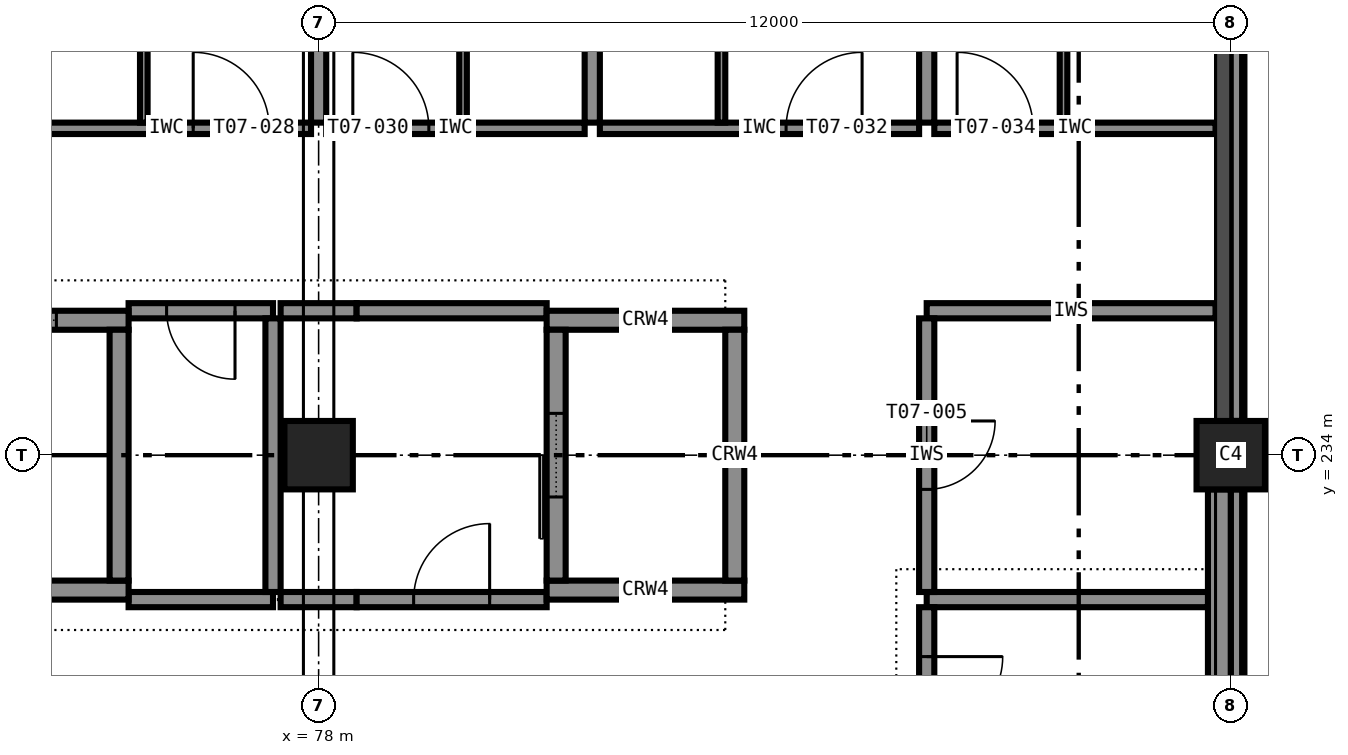
"""IFC4 building model, lengths in metres.
Left out: names, types, materials, properties, quantities, classifications, styles, units other than length and angle.
Written with IfcOpenShell. Run it as: python <this file> out.ifc"""

import sys

from ifc_helpers import new_model, si_unit, direction, frame, frame_2d, origin, origin_2d, place, context, subcontext, project, spatial, rectangle, extrude, element, fill, save


model = new_model("IFC4")
c1 = context("Model", 3, precision=1e-05, world=origin(), true_north=direction((0.0, 1.0)))
c2 = subcontext(c1, "Body", "Model", "MODEL_VIEW")
j1 = project(units=[si_unit("LENGTHUNIT", "METRE"), si_unit("PLANEANGLEUNIT", "RADIAN")], contexts=[c1])
p1 = place(None, origin())
s1 = spatial("IfcSite", under=j1, at=p1, CompositionType="ELEMENT")
p2 = place(p1, origin())
s2 = spatial("IfcBuilding", under=s1, at=p2, CompositionType="ELEMENT")
p3 = place(p2, frame((0.0, 0.0, 31.8)))
s3 = spatial("IfcBuildingStorey", under=s2, at=p3, CompositionType="ELEMENT", Elevation=31.8)
for number, where, z_axis, x_axis in (
    (1, (78.0, 234.0, 0.0), (0.0, 0.0, 1.0), (1.0, 0.0, 0.0)),
    (2, (90.0, 234.0, 0.0), (0.0, 0.0, 1.0), (1.0, 0.0, 0.0)),
):
    element("IfcColumn", number, at=place(p3, frame(where, z_axis=z_axis, x_axis=x_axis)), inside=s3, PredefinedType="COLUMN", context=c2, shape_type="SweptSolid", body=[
        extrude(rectangle(XDim=0.9, YDim=0.9, at=origin_2d()), origin(), (0.0, 0.0, 1.0), 3.6),
    ])
p4 = place(p3, frame((72.5, 232.225, 0.0), z_axis=(0.0, 0.0, 1.0), x_axis=(1.0, 0.0, 0.0)))
e3 = element("IfcWall", 3, at=p4, inside=s3, PredefinedType="SHEAR", context=c2, shape_type="SweptSolid", body=[
    extrude(rectangle(XDim=3.0, YDim=0.25, at=frame_2d((1.5, 0.0))), origin(), (0.0, 0.0, 1.0), 3.6),
])
p5 = place(p3, frame((72.5, 235.775, 0.0), z_axis=(0.0, 0.0, 1.0), x_axis=(1.0, 0.0, 0.0)))
e4 = element("IfcWall", 4, at=p5, inside=s3, PredefinedType="SHEAR", context=c2, shape_type="SweptSolid", body=[
    extrude(rectangle(XDim=3.0, YDim=0.25, at=frame_2d((1.5, 0.0))), origin(), (0.0, 0.0, 1.0), 3.6),
])
p6 = place(p5, frame((0.95, 0.0, 0.0)))
e5 = element("IfcOpeningElement", 5, at=p6, cuts=e4, PredefinedType="OPENING", context=c2, shape_type="SweptSolid", body=[
    extrude(rectangle(XDim=1.1, YDim=2.1, at=frame_2d((0.55, 1.05))), frame((0.0, 0.135, 0.0), z_axis=(0.0, -1.0, 0.0), x_axis=(1.0, 0.0, 0.0)), (0.0, 0.0, 1.0), 0.27),
])
p7 = place(p3, frame((75.375, 232.35, 0.0), z_axis=(0.0, 0.0, 1.0), x_axis=(0.0, 1.0, 0.0)))
e6 = element("IfcWall", 6, at=p7, inside=s3, PredefinedType="SHEAR", context=c2, shape_type="SweptSolid", body=[
    extrude(rectangle(XDim=3.3, YDim=0.25, at=frame_2d((1.65, 0.0))), origin(), (0.0, 0.0, 1.0), 3.6),
])
for number, where, z_axis, x_axis in (
    (7, (81.0, 232.225, 0.0), (0.0, 0.0, 1.0), (1.0, 0.0, 0.0)),
    (8, (81.0, 235.775, 0.0), (0.0, 0.0, 1.0), (1.0, 0.0, 0.0)),
):
    element("IfcWall", number, at=place(p3, frame(where, z_axis=z_axis, x_axis=x_axis)), inside=s3, PredefinedType="SHEAR", context=c2, shape_type="SweptSolid", body=[
        extrude(rectangle(XDim=2.6, YDim=0.25, at=frame_2d((1.3, 0.0))), origin(), (0.0, 0.0, 1.0), 3.6),
    ])
p8 = place(p3, frame((81.125, 232.35, 0.0), z_axis=(0.0, 0.0, 1.0), x_axis=(0.0, 1.0, 0.0)))
e9 = element("IfcWall", 9, at=p8, inside=s3, PredefinedType="SHEAR", context=c2, shape_type="SweptSolid", body=[
    extrude(rectangle(XDim=3.3, YDim=0.25, at=frame_2d((1.65, 0.0))), origin(), (0.0, 0.0, 1.0), 3.6),
])
p9 = place(p8, frame((1.1, 0.0, 0.0)))
e10 = element("IfcOpeningElement", 10, at=p9, cuts=e9, PredefinedType="OPENING", context=c2, shape_type="SweptSolid", body=[
    extrude(rectangle(XDim=1.1, YDim=2.1, at=frame_2d((0.55, 1.05))), frame((0.0, 0.135, 0.0), z_axis=(0.0, -1.0, 0.0), x_axis=(1.0, 0.0, 0.0)), (0.0, 0.0, 1.0), 0.27),
])
p10 = place(p3, frame((83.475, 232.35, 0.0), z_axis=(0.0, 0.0, 1.0), x_axis=(0.0, 1.0, 0.0)))
e11 = element("IfcWall", 11, at=p10, inside=s3, PredefinedType="SHEAR", context=c2, shape_type="SweptSolid", body=[
    extrude(rectangle(XDim=3.3, YDim=0.25, at=frame_2d((1.65, 0.0))), origin(), (0.0, 0.0, 1.0), 3.6),
])
p11 = place(p3, frame((89.85, 222.45, 0.0), z_axis=(0.0, 0.0, 1.0), x_axis=(0.0, 1.0, 0.0)))
e12 = element("IfcWall", 12, at=p11, inside=s3, PredefinedType="STANDARD", context=c2, shape_type="SweptSolid", body=[
    extrude(rectangle(XDim=11.1, YDim=0.3, at=frame_2d((5.55, 0.0))), origin(), (0.0, 0.0, 1.0), 2.6),
])
for number, where, z_axis, x_axis in (
    (13, (90.075, 222.45, 3.4), (0.0, 0.0, 1.0), (0.0, 1.0, 0.0)),
    (14, (90.075, 234.45, 3.4), (0.0, 0.0, 1.0), (0.0, 1.0, 0.0)),
):
    element("IfcWall", number, at=place(p3, frame(where, z_axis=z_axis, x_axis=x_axis)), inside=s3, PredefinedType="STANDARD", context=c2, shape_type="SweptSolid", body=[
        extrude(rectangle(XDim=11.1, YDim=0.15, at=frame_2d((5.55, 0.0))), origin(), (0.0, 0.0, 1.0), 0.2),
    ])
p12 = place(p3, frame((75.5, 232.1, 0.0), z_axis=(0.0, 0.0, 1.0), x_axis=(1.0, 0.0, 0.0)))
e15 = element("IfcWall", 15, at=p12, inside=s3, PredefinedType="PARTITIONING", context=c2, shape_type="SweptSolid", body=[
    extrude(rectangle(XDim=1.9, YDim=0.2, at=frame_2d((0.95, 0.0))), origin(), (0.0, 0.0, 1.0), 3.4),
])
p13 = place(p3, frame((77.5, 232.1, 0.0), z_axis=(0.0, 0.0, 1.0), x_axis=(1.0, 0.0, 0.0)))
e16 = element("IfcWall", 16, at=p13, inside=s3, PredefinedType="PARTITIONING", context=c2, shape_type="SweptSolid", body=[
    extrude(rectangle(XDim=1.0, YDim=0.2, at=frame_2d((0.5, 0.0))), origin(), (0.0, 0.0, 1.0), 3.4),
])
p14 = place(p3, frame((78.5, 232.1, 0.0), z_axis=(0.0, 0.0, 1.0), x_axis=(1.0, 0.0, 0.0)))
e17 = element("IfcWall", 17, at=p14, inside=s3, PredefinedType="PARTITIONING", context=c2, shape_type="SweptSolid", body=[
    extrude(rectangle(XDim=2.5, YDim=0.2, at=frame_2d((1.25, 0.0))), origin(), (0.0, 0.0, 1.0), 3.4),
])
p15 = place(p14, frame((0.75, 0.0, 0.0)))
e18 = element("IfcOpeningElement", 18, at=p15, cuts=e17, PredefinedType="OPENING", context=c2, shape_type="SweptSolid", body=[
    extrude(rectangle(XDim=1.0, YDim=2.1, at=frame_2d((0.5, 1.05))), frame((0.0, 0.11, 0.0), z_axis=(0.0, -1.0, 0.0), x_axis=(1.0, 0.0, 0.0)), (0.0, 0.0, 1.0), 0.22),
])
p16 = place(p3, frame((86.0, 232.1, 0.0), z_axis=(0.0, 0.0, 1.0), x_axis=(1.0, 0.0, 0.0)))
e19 = element("IfcWall", 19, at=p16, inside=s3, PredefinedType="PARTITIONING", context=c2, shape_type="SweptSolid", body=[
    extrude(rectangle(XDim=3.7, YDim=0.2, at=frame_2d((1.85, 0.0))), origin(), (0.0, 0.0, 1.0), 3.4),
])
p17 = place(p3, frame((77.4, 235.9, 0.0), z_axis=(0.0, 0.0, 1.0), x_axis=(-1.0, 0.0, 0.0)))
e20 = element("IfcWall", 20, at=p17, inside=s3, PredefinedType="PARTITIONING", context=c2, shape_type="SweptSolid", body=[
    extrude(rectangle(XDim=1.9, YDim=0.2, at=frame_2d((0.95, 0.0))), origin(), (0.0, 0.0, 1.0), 3.4),
])
p18 = place(p17, frame((0.5, 0.0, 0.0)))
e21 = element("IfcOpeningElement", 21, at=p18, cuts=e20, PredefinedType="OPENING", context=c2, shape_type="SweptSolid", body=[
    extrude(rectangle(XDim=0.9, YDim=2.1, at=frame_2d((0.45, 1.05))), frame((0.0, 0.11, 0.0), z_axis=(0.0, -1.0, 0.0), x_axis=(1.0, 0.0, 0.0)), (0.0, 0.0, 1.0), 0.22),
])
p19 = place(p3, frame((77.5, 235.9, 0.0), z_axis=(0.0, 0.0, 1.0), x_axis=(1.0, 0.0, 0.0)))
e22 = element("IfcWall", 22, at=p19, inside=s3, PredefinedType="PARTITIONING", context=c2, shape_type="SweptSolid", body=[
    extrude(rectangle(XDim=1.0, YDim=0.2, at=frame_2d((0.5, 0.0))), origin(), (0.0, 0.0, 1.0), 3.4),
])
p20 = place(p3, frame((78.5, 235.9, 0.0), z_axis=(0.0, 0.0, 1.0), x_axis=(1.0, 0.0, 0.0)))
e23 = element("IfcWall", 23, at=p20, inside=s3, PredefinedType="PARTITIONING", context=c2, shape_type="SweptSolid", body=[
    extrude(rectangle(XDim=2.5, YDim=0.2, at=frame_2d((1.25, 0.0))), origin(), (0.0, 0.0, 1.0), 3.4),
])
p21 = place(p3, frame((86.0, 235.9, 0.0), z_axis=(0.0, 0.0, 1.0), x_axis=(1.0, 0.0, 0.0)))
e24 = element("IfcWall", 24, at=p21, inside=s3, PredefinedType="PARTITIONING", context=c2, shape_type="SweptSolid", body=[
    extrude(rectangle(XDim=3.8, YDim=0.2, at=frame_2d((1.9, 0.0))), origin(), (0.0, 0.0, 1.0), 3.4),
])
p22 = place(p3, frame((77.4, 232.2, 0.0), z_axis=(0.0, 0.0, 1.0), x_axis=(0.0, 1.0, 0.0)))
e25 = element("IfcWall", 25, at=p22, inside=s3, PredefinedType="PARTITIONING", context=c2, shape_type="SweptSolid", body=[
    extrude(rectangle(XDim=3.6, YDim=0.2, at=frame_2d((1.8, 0.0))), origin(), (0.0, 0.0, 1.0), 3.4),
])
p23 = place(p3, frame((86.0, 235.8, 0.0), z_axis=(0.0, 0.0, 1.0), x_axis=(0.0, -1.0, 0.0)))
e26 = element("IfcWall", 26, at=p23, inside=s3, PredefinedType="PARTITIONING", context=c2, shape_type="SweptSolid", body=[
    extrude(rectangle(XDim=3.6, YDim=0.2, at=frame_2d((1.8, 0.0))), origin(), (0.0, 0.0, 1.0), 3.4),
])
p24 = place(p23, frame((1.35, 0.0, 0.0)))
e27 = element("IfcOpeningElement", 27, at=p24, cuts=e26, PredefinedType="OPENING", context=c2, shape_type="SweptSolid", body=[
    extrude(rectangle(XDim=0.9, YDim=2.1, at=frame_2d((0.45, 1.05))), frame((0.0, 0.11, 0.0), z_axis=(0.0, -1.0, 0.0), x_axis=(1.0, 0.0, 0.0)), (0.0, 0.0, 1.0), 0.22),
])
p25 = place(p3, frame((86.0, 232.0, 0.0), z_axis=(0.0, 0.0, 1.0), x_axis=(0.0, -1.0, 0.0)))
e28 = element("IfcWall", 28, at=p25, inside=s3, PredefinedType="PARTITIONING", context=c2, shape_type="SweptSolid", body=[
    extrude(rectangle(XDim=2.3, YDim=0.2, at=frame_2d((1.15, 0.0))), origin(), (0.0, 0.0, 1.0), 3.4),
])
p26 = place(p25, frame((0.65, 0.0, 0.0)))
e29 = element("IfcOpeningElement", 29, at=p26, cuts=e28, PredefinedType="OPENING", context=c2, shape_type="SweptSolid", body=[
    extrude(rectangle(XDim=1.0, YDim=2.1, at=frame_2d((0.5, 1.05))), frame((0.0, 0.11, 0.0), z_axis=(0.0, -1.0, 0.0), x_axis=(1.0, 0.0, 0.0)), (0.0, 0.0, 1.0), 0.22),
])
p27 = place(p3, frame((74.1, 238.3, 0.0), z_axis=(0.0, 0.0, 1.0), x_axis=(1.0, 0.0, 0.0)))
e30 = element("IfcWall", 30, at=p27, inside=s3, PredefinedType="PARTITIONING", context=c2, shape_type="SweptSolid", body=[
    extrude(rectangle(XDim=3.8, YDim=0.15, at=frame_2d((1.9, 0.0))), origin(), (0.0, 0.0, 1.0), 3.4),
])
p28 = place(p27, frame((2.25, 0.0, 0.0)))
e31 = element("IfcOpeningElement", 31, at=p28, cuts=e30, PredefinedType="OPENING", context=c2, shape_type="SweptSolid", body=[
    extrude(rectangle(XDim=1.0, YDim=2.1, at=frame_2d((0.5, 1.05))), frame((0.0, 0.085, 0.0), z_axis=(0.0, -1.0, 0.0), x_axis=(1.0, 0.0, 0.0)), (0.0, 0.0, 1.0), 0.17),
])
p29 = place(p3, frame((75.7, 241.25, 0.0), z_axis=(0.0, 0.0, 1.0), x_axis=(0.0, -1.0, 0.0)))
e32 = element("IfcWall", 32, at=p29, inside=s3, PredefinedType="PARTITIONING", context=c2, shape_type="SweptSolid", body=[
    extrude(rectangle(XDim=2.875, YDim=0.1, at=frame_2d((1.438, 0.0))), origin(), (0.0, 0.0, 1.0), 3.4),
])
p30 = place(p29, frame((1.038, 0.0, 0.0)))
e33 = element("IfcOpeningElement", 33, at=p30, cuts=e32, PredefinedType="OPENING", context=c2, shape_type="SweptSolid", body=[
    extrude(rectangle(XDim=0.8, YDim=2.1, at=frame_2d((0.4, 1.05))), frame((0.0, 0.06, 0.0), z_axis=(0.0, -1.0, 0.0), x_axis=(1.0, 0.0, 0.0)), (0.0, 0.0, 1.0), 0.12),
])
p31 = place(p3, frame((78.1, 238.3, 0.0), z_axis=(0.0, 0.0, 1.0), x_axis=(1.0, 0.0, 0.0)))
e34 = element("IfcWall", 34, at=p31, inside=s3, PredefinedType="PARTITIONING", context=c2, shape_type="SweptSolid", body=[
    extrude(rectangle(XDim=3.4, YDim=0.15, at=frame_2d((1.7, 0.0))), origin(), (0.0, 0.0, 1.0), 3.4),
])
p32 = place(p31, frame((0.35, 0.0, 0.0)))
e35 = element("IfcOpeningElement", 35, at=p32, cuts=e34, PredefinedType="OPENING", context=c2, shape_type="SweptSolid", body=[
    extrude(rectangle(XDim=1.0, YDim=2.1, at=frame_2d((0.5, 1.05))), frame((0.0, 0.085, 0.0), z_axis=(0.0, -1.0, 0.0), x_axis=(1.0, 0.0, 0.0)), (0.0, 0.0, 1.0), 0.17),
])
p33 = place(p3, frame((79.9, 238.375, 0.0), z_axis=(0.0, 0.0, 1.0), x_axis=(0.0, 1.0, 0.0)))
e36 = element("IfcWall", 36, at=p33, inside=s3, PredefinedType="PARTITIONING", context=c2, shape_type="SweptSolid", body=[
    extrude(rectangle(XDim=2.875, YDim=0.1, at=frame_2d((1.438, 0.0))), origin(), (0.0, 0.0, 1.0), 3.4),
])
p34 = place(p33, frame((1.038, 0.0, 0.0)))
e37 = element("IfcOpeningElement", 37, at=p34, cuts=e36, PredefinedType="OPENING", context=c2, shape_type="SweptSolid", body=[
    extrude(rectangle(XDim=0.8, YDim=2.1, at=frame_2d((0.4, 1.05))), frame((0.0, 0.06, 0.0), z_axis=(0.0, -1.0, 0.0), x_axis=(1.0, 0.0, 0.0)), (0.0, 0.0, 1.0), 0.12),
])
p35 = place(p3, frame((81.7, 238.3, 0.0), z_axis=(0.0, 0.0, 1.0), x_axis=(1.0, 0.0, 0.0)))
e38 = element("IfcWall", 38, at=p35, inside=s3, PredefinedType="PARTITIONING", context=c2, shape_type="SweptSolid", body=[
    extrude(rectangle(XDim=4.2, YDim=0.15, at=frame_2d((2.1, 0.0))), origin(), (0.0, 0.0, 1.0), 3.4),
])
p36 = place(p35, frame((2.45, 0.0, 0.0)))
e39 = element("IfcOpeningElement", 39, at=p36, cuts=e38, PredefinedType="OPENING", context=c2, shape_type="SweptSolid", body=[
    extrude(rectangle(XDim=1.0, YDim=2.1, at=frame_2d((0.5, 1.05))), frame((0.0, 0.085, 0.0), z_axis=(0.0, -1.0, 0.0), x_axis=(1.0, 0.0, 0.0)), (0.0, 0.0, 1.0), 0.17),
])
p37 = place(p3, frame((83.3, 241.25, 0.0), z_axis=(0.0, 0.0, 1.0), x_axis=(0.0, -1.0, 0.0)))
e40 = element("IfcWall", 40, at=p37, inside=s3, PredefinedType="PARTITIONING", context=c2, shape_type="SweptSolid", body=[
    extrude(rectangle(XDim=2.875, YDim=0.1, at=frame_2d((1.438, 0.0))), origin(), (0.0, 0.0, 1.0), 3.4),
])
p38 = place(p37, frame((1.038, 0.0, 0.0)))
e41 = element("IfcOpeningElement", 41, at=p38, cuts=e40, PredefinedType="OPENING", context=c2, shape_type="SweptSolid", body=[
    extrude(rectangle(XDim=0.8, YDim=2.1, at=frame_2d((0.4, 1.05))), frame((0.0, 0.06, 0.0), z_axis=(0.0, -1.0, 0.0), x_axis=(1.0, 0.0, 0.0)), (0.0, 0.0, 1.0), 0.12),
])
p39 = place(p3, frame((86.1, 238.3, 0.0), z_axis=(0.0, 0.0, 1.0), x_axis=(1.0, 0.0, 0.0)))
e42 = element("IfcWall", 42, at=p39, inside=s3, PredefinedType="PARTITIONING", context=c2, shape_type="SweptSolid", body=[
    extrude(rectangle(XDim=3.7, YDim=0.15, at=frame_2d((1.85, 0.0))), origin(), (0.0, 0.0, 1.0), 3.4),
])
p40 = place(p39, frame((0.3, 0.0, 0.0)))
e43 = element("IfcOpeningElement", 43, at=p40, cuts=e42, PredefinedType="OPENING", context=c2, shape_type="SweptSolid", body=[
    extrude(rectangle(XDim=1.0, YDim=2.1, at=frame_2d((0.5, 1.05))), frame((0.0, 0.085, 0.0), z_axis=(0.0, -1.0, 0.0), x_axis=(1.0, 0.0, 0.0)), (0.0, 0.0, 1.0), 0.17),
])
p41 = place(p3, frame((87.8, 238.375, 0.0), z_axis=(0.0, 0.0, 1.0), x_axis=(0.0, 1.0, 0.0)))
e44 = element("IfcWall", 44, at=p41, inside=s3, PredefinedType="PARTITIONING", context=c2, shape_type="SweptSolid", body=[
    extrude(rectangle(XDim=2.875, YDim=0.1, at=frame_2d((1.438, 0.0))), origin(), (0.0, 0.0, 1.0), 3.4),
])
p42 = place(p41, frame((1.038, 0.0, 0.0)))
e45 = element("IfcOpeningElement", 45, at=p42, cuts=e44, PredefinedType="OPENING", context=c2, shape_type="SweptSolid", body=[
    extrude(rectangle(XDim=0.8, YDim=2.1, at=frame_2d((0.4, 1.05))), frame((0.0, 0.06, 0.0), z_axis=(0.0, -1.0, 0.0), x_axis=(1.0, 0.0, 0.0)), (0.0, 0.0, 1.0), 0.12),
])
p43 = place(p3, frame((78.0, 245.55, 0.0), z_axis=(0.0, 0.0, 1.0), x_axis=(0.0, -1.0, 0.0)))
e46 = element("IfcWall", 46, at=p43, inside=s3, PredefinedType="PARTITIONING", context=c2, shape_type="SweptSolid", body=[
    extrude(rectangle(XDim=7.175, YDim=0.2, at=frame_2d((3.587, 0.0))), origin(), (0.0, 0.0, 1.0), 2.6),
])
for number, where, z_axis, x_axis in (
    (47, (81.6, 245.7, 0.0), (0.0, 0.0, 1.0), (0.0, -1.0, 0.0)),
    (48, (86.0, 245.7, 0.0), (0.0, 0.0, 1.0), (0.0, -1.0, 0.0)),
):
    element("IfcWall", number, at=place(p3, frame(where, z_axis=z_axis, x_axis=x_axis)), inside=s3, PredefinedType="PARTITIONING", context=c2, shape_type="SweptSolid", body=[
        extrude(rectangle(XDim=7.325, YDim=0.2, at=frame_2d((3.663, 0.0))), origin(), (0.0, 0.0, 1.0), 3.4),
    ])
p44 = place(p18, origin())
e49 = element("IfcDoor", 49, at=p44, inside=s3, OperationType="SINGLE_SWING_LEFT", PredefinedType="DOOR", context=c2, shape_type="SweptSolid", body=[
    extrude(rectangle(XDim=0.9, YDim=2.1, at=frame_2d((0.45, 1.05))), frame((0.0, 0.025, 0.0), z_axis=(0.0, -1.0, 0.0), x_axis=(1.0, 0.0, 0.0)), (0.0, 0.0, 1.0), 0.05),
])
fill(e21, e49)
p45 = place(p15, origin())
e50 = element("IfcDoor", 50, at=p45, inside=s3, OperationType="SINGLE_SWING_RIGHT", PredefinedType="DOOR", context=c2, shape_type="SweptSolid", body=[
    extrude(rectangle(XDim=1.0, YDim=2.1, at=frame_2d((0.5, 1.05))), frame((0.0, 0.025, 0.0), z_axis=(0.0, -1.0, 0.0), x_axis=(1.0, 0.0, 0.0)), (0.0, 0.0, 1.0), 0.05),
])
fill(e18, e50)
p46 = place(p24, origin())
e51 = element("IfcDoor", 51, at=p46, inside=s3, OperationType="SINGLE_SWING_LEFT", PredefinedType="DOOR", context=c2, shape_type="SweptSolid", body=[
    extrude(rectangle(XDim=0.9, YDim=2.1, at=frame_2d((0.45, 1.05))), frame((0.0, 0.025, 0.0), z_axis=(0.0, -1.0, 0.0), x_axis=(1.0, 0.0, 0.0)), (0.0, 0.0, 1.0), 0.05),
])
fill(e27, e51)
p47 = place(p26, origin())
e52 = element("IfcDoor", 52, at=p47, inside=s3, OperationType="SINGLE_SWING_LEFT", PredefinedType="DOOR", context=c2, shape_type="SweptSolid", body=[
    extrude(rectangle(XDim=1.0, YDim=2.1, at=frame_2d((0.5, 1.05))), frame((0.0, 0.025, 0.0), z_axis=(0.0, -1.0, 0.0), x_axis=(1.0, 0.0, 0.0)), (0.0, 0.0, 1.0), 0.05),
])
fill(e29, e52)
p48 = place(p28, origin())
e53 = element("IfcDoor", 53, at=p48, inside=s3, OperationType="SINGLE_SWING_LEFT", PredefinedType="DOOR", context=c2, shape_type="SweptSolid", body=[
    extrude(rectangle(XDim=1.0, YDim=2.1, at=frame_2d((0.5, 1.05))), frame((0.0, 0.025, 0.0), z_axis=(0.0, -1.0, 0.0), x_axis=(1.0, 0.0, 0.0)), (0.0, 0.0, 1.0), 0.05),
])
fill(e31, e53)
p49 = place(p32, origin())
e54 = element("IfcDoor", 54, at=p49, inside=s3, OperationType="SINGLE_SWING_LEFT", PredefinedType="DOOR", context=c2, shape_type="SweptSolid", body=[
    extrude(rectangle(XDim=1.0, YDim=2.1, at=frame_2d((0.5, 1.05))), frame((0.0, 0.025, 0.0), z_axis=(0.0, -1.0, 0.0), x_axis=(1.0, 0.0, 0.0)), (0.0, 0.0, 1.0), 0.05),
])
fill(e35, e54)
p50 = place(p36, origin())
e55 = element("IfcDoor", 55, at=p50, inside=s3, OperationType="SINGLE_SWING_RIGHT", PredefinedType="DOOR", context=c2, shape_type="SweptSolid", body=[
    extrude(rectangle(XDim=1.0, YDim=2.1, at=frame_2d((0.5, 1.05))), frame((0.0, 0.025, 0.0), z_axis=(0.0, -1.0, 0.0), x_axis=(1.0, 0.0, 0.0)), (0.0, 0.0, 1.0), 0.05),
])
fill(e39, e55)
p51 = place(p40, origin())
e56 = element("IfcDoor", 56, at=p51, inside=s3, OperationType="SINGLE_SWING_LEFT", PredefinedType="DOOR", context=c2, shape_type="SweptSolid", body=[
    extrude(rectangle(XDim=1.0, YDim=2.1, at=frame_2d((0.5, 1.05))), frame((0.0, 0.025, 0.0), z_axis=(0.0, -1.0, 0.0), x_axis=(1.0, 0.0, 0.0)), (0.0, 0.0, 1.0), 0.05),
])
fill(e43, e56)
p52 = place(p6, origin())
e57 = element("IfcDoor", 57, at=p52, inside=s3, OperationType="SLIDING_TO_LEFT", PredefinedType="DOOR", context=c2, shape_type="SweptSolid", body=[
    extrude(rectangle(XDim=1.1, YDim=2.1, at=frame_2d((0.55, 1.05))), frame((0.0, 0.025, 0.0), z_axis=(0.0, -1.0, 0.0), x_axis=(1.0, 0.0, 0.0)), (0.0, 0.0, 1.0), 0.05),
])
fill(e5, e57)
p53 = place(p9, origin())
e58 = element("IfcDoor", 58, at=p53, inside=s3, OperationType="SLIDING_TO_LEFT", PredefinedType="DOOR", context=c2, shape_type="SweptSolid", body=[
    extrude(rectangle(XDim=1.1, YDim=2.1, at=frame_2d((0.55, 1.05))), frame((0.0, 0.025, 0.0), z_axis=(0.0, -1.0, 0.0), x_axis=(1.0, 0.0, 0.0)), (0.0, 0.0, 1.0), 0.05),
])
fill(e10, e58)
save(model, sys.argv[1])
